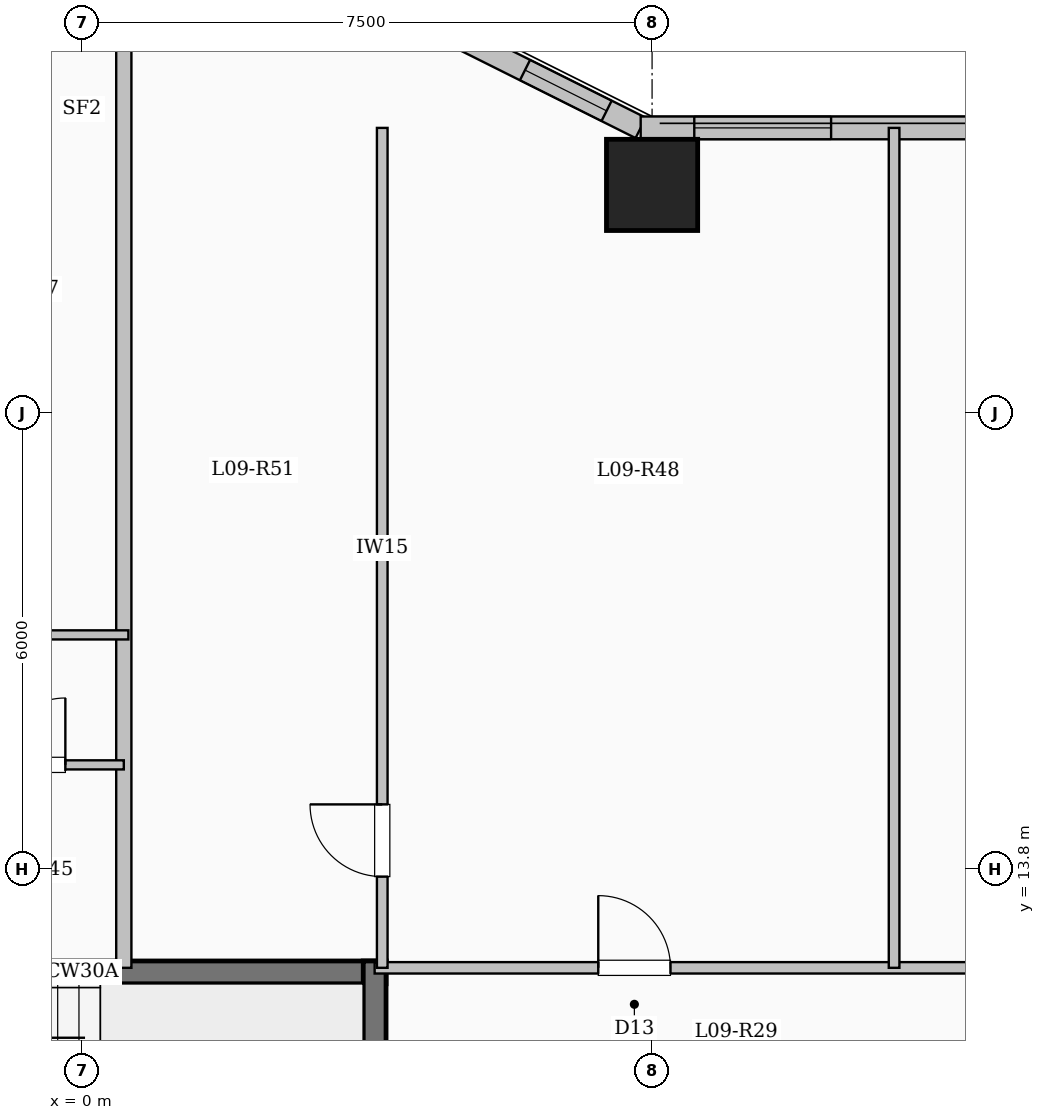
"""IFC4 building model, lengths in metres.
Left out: names, types, materials, properties, quantities, classifications, styles, units other than length and angle.
Written with IfcOpenShell. Run it as: python <this file> out.ifc"""

import sys

from ifc_helpers import new_model, si_unit, direction, frame, frame_2d, origin, origin_2d, place, context, subcontext, project, spatial, rectangle, extrude, element, fill, save


model = new_model("IFC4")
c1 = context("Model", 3, precision=1e-05, world=origin(), true_north=direction((0.0, 1.0)))
c2 = subcontext(c1, "Body", "Model", "MODEL_VIEW")
j1 = project(units=[si_unit("LENGTHUNIT", "METRE"), si_unit("PLANEANGLEUNIT", "RADIAN")], contexts=[c1])
p1 = place(None, origin())
s1 = spatial("IfcSite", under=j1, at=p1, CompositionType="ELEMENT")
p2 = place(p1, origin())
s2 = spatial("IfcBuilding", under=s1, at=p2, CompositionType="ELEMENT")
p3 = place(p2, frame((0.0, 0.0, 37.4)))
s3 = spatial("IfcBuildingStorey", under=s2, at=p3, CompositionType="ELEMENT", Elevation=37.4)
p4 = place(p3, frame((7.5, 22.8, 0.0), z_axis=(0.0, 0.0, 1.0), x_axis=(1.0, 0.0, 0.0)))
e1 = element("IfcColumn", 1, at=p4, inside=s3, PredefinedType="COLUMN", context=c2, shape_type="SweptSolid", body=[
    extrude(rectangle(XDim=1.2, YDim=1.2, at=origin_2d()), origin(), (0.0, 0.0, 1.0), 3.35),
])
p5 = place(p3, frame((4.35, 25.05, 0.0), z_axis=(0.0, 0.0, 1.0), x_axis=(0.894427191, -0.4472135955, 0.0)))
e2 = element("IfcWall", 2, at=p5, inside=s3, PredefinedType="SOLIDWALL", context=c2, shape_type="SweptSolid", body=[
    extrude(rectangle(XDim=3.354, YDim=0.3, at=frame_2d((1.677, 0.0))), origin(), (0.0, 0.0, 1.0), 3.1),
])
p6 = place(p5, frame((1.653, 0.0, 0.95)))
e3 = element("IfcOpeningElement", 3, at=p6, cuts=e2, PredefinedType="OPENING", context=c2, shape_type="SweptSolid", body=[
    extrude(rectangle(XDim=1.2, YDim=1.5, at=frame_2d((0.6, 0.75))), frame((0.0, 0.16, 0.0), z_axis=(0.0, -1.0, 0.0), x_axis=(1.0, 0.0, 0.0)), (0.0, 0.0, 1.0), 0.32),
])
p7 = place(p3, frame((7.35, 23.55, 0.0), z_axis=(0.0, 0.0, 1.0), x_axis=(1.0, 0.0, 0.0)))
e4 = element("IfcWall", 4, at=p7, inside=s3, PredefinedType="SOLIDWALL", context=c2, shape_type="SweptSolid", body=[
    extrude(rectangle(XDim=15.3, YDim=0.3, at=frame_2d((7.65, 0.0))), origin(), (0.0, 0.0, 1.0), 3.1),
])
p8 = place(p7, frame((0.705, 0.0, 0.9)))
e5 = element("IfcOpeningElement", 5, at=p8, cuts=e4, PredefinedType="OPENING", context=c2, shape_type="SweptSolid", body=[
    extrude(rectangle(XDim=1.8, YDim=1.65, at=frame_2d((0.9, 0.825))), frame((0.0, 0.16, 0.0), z_axis=(0.0, -1.0, 0.0), x_axis=(1.0, 0.0, 0.0)), (0.0, 0.0, 1.0), 0.32),
])
p9 = place(p7, frame((5.672, 0.0, 0.9)))
e6 = element("IfcOpeningElement", 6, at=p9, cuts=e4, PredefinedType="OPENING", context=c2, shape_type="SweptSolid", body=[
    extrude(rectangle(XDim=2.0, YDim=1.7, at=frame_2d((1.0, 0.85))), frame((0.0, 0.16, 0.0), z_axis=(0.0, -1.0, 0.0), x_axis=(1.0, 0.0, 0.0)), (0.0, 0.0, 1.0), 0.32),
])
p10 = place(p7, frame((11.641, 0.0, 0.9)))
e7 = element("IfcOpeningElement", 7, at=p10, cuts=e4, PredefinedType="OPENING", context=c2, shape_type="SweptSolid", body=[
    extrude(rectangle(XDim=2.0, YDim=1.7, at=frame_2d((1.0, 0.85))), frame((0.0, 0.16, 0.0), z_axis=(0.0, -1.0, 0.0), x_axis=(1.0, 0.0, 0.0)), (0.0, 0.0, 1.0), 0.32),
])
p11 = place(p3, frame((-4.0, 12.44, 0.0), z_axis=(0.0, 0.0, 1.0), x_axis=(1.0, 0.0, 0.0)))
e8 = element("IfcWall", 8, at=p11, inside=s3, PredefinedType="SHEAR", context=c2, shape_type="SweptSolid", body=[
    extrude(rectangle(XDim=8.0, YDim=0.3, at=frame_2d((4.0, 0.0))), origin(), (0.0, 0.0, 1.0), 3.35),
])
p12 = place(p3, frame((3.85, 9.0, 0.0), z_axis=(0.0, 0.0, 1.0), x_axis=(0.0, 1.0, 0.0)))
e9 = element("IfcWall", 9, at=p12, inside=s3, PredefinedType="SHEAR", context=c2, shape_type="SweptSolid", body=[
    extrude(rectangle(XDim=3.59, YDim=0.3, at=frame_2d((1.795, 0.0))), origin(), (0.0, 0.0, 1.0), 3.35),
])
p13 = place(p3, frame((3.85, 12.5, 0.0), z_axis=(0.0, 0.0, 1.0), x_axis=(1.0, 0.0, 0.0)))
e10 = element("IfcWall", 10, at=p13, inside=s3, PredefinedType="PARTITIONING", context=c2, shape_type="SweptSolid", body=[
    extrude(rectangle(XDim=18.7, YDim=0.15, at=frame_2d((9.35, 0.0))), origin(), (0.0, 0.0, 1.0), 3.1),
])
p14 = place(p13, frame((2.942, 0.0, 0.0)))
e11 = element("IfcOpeningElement", 11, at=p14, cuts=e10, PredefinedType="OPENING", context=c2, shape_type="SweptSolid", body=[
    extrude(rectangle(XDim=0.95, YDim=2.15, at=frame_2d((0.475, 1.075))), frame((0.0, 0.085, 0.0), z_axis=(0.0, -1.0, 0.0), x_axis=(1.0, 0.0, 0.0)), (0.0, 0.0, 1.0), 0.17),
])
p15 = place(p13, frame((9.647, 0.0, 0.0)))
e12 = element("IfcOpeningElement", 12, at=p15, cuts=e10, PredefinedType="OPENING", context=c2, shape_type="SweptSolid", body=[
    extrude(rectangle(XDim=0.95, YDim=2.15, at=frame_2d((0.475, 1.075))), frame((0.0, 0.085, 0.0), z_axis=(0.0, -1.0, 0.0), x_axis=(1.0, 0.0, 0.0)), (0.0, 0.0, 1.0), 0.17),
])
p16 = place(p13, frame((15.61, 0.0, 0.0)))
e13 = element("IfcOpeningElement", 13, at=p16, cuts=e10, PredefinedType="OPENING", context=c2, shape_type="SweptSolid", body=[
    extrude(rectangle(XDim=0.95, YDim=2.15, at=frame_2d((0.475, 1.075))), frame((0.0, 0.085, 0.0), z_axis=(0.0, -1.0, 0.0), x_axis=(1.0, 0.0, 0.0)), (0.0, 0.0, 1.0), 0.17),
])
p17 = place(p3, frame((0.55, 12.5, 0.0), z_axis=(0.0, 0.0, 1.0), x_axis=(0.0, 1.0, 0.0)))
e14 = element("IfcWall", 14, at=p17, inside=s3, PredefinedType="SOLIDWALL", context=c2, shape_type="SweptSolid", body=[
    extrude(rectangle(XDim=12.58, YDim=0.2, at=frame_2d((6.29, 0.0))), origin(), (0.0, 0.0, 1.0), 3.1),
])
p18 = place(p3, frame((-1.868, 15.17, 0.0), z_axis=(0.0, 0.0, 1.0), x_axis=(1.0, 0.0, 0.0)))
e15 = element("IfcWall", 15, at=p18, inside=s3, PredefinedType="PARTITIONING", context=c2, shape_type="SweptSolid", body=[
    extrude(rectangle(XDim=2.418, YDim=0.12, at=frame_2d((1.209, 0.0))), origin(), (0.0, 0.0, 1.0), 3.1),
])
p19 = place(p18, frame((0.769, 0.0, 0.0)))
e16 = element("IfcOpeningElement", 16, at=p19, cuts=e15, PredefinedType="OPENING", context=c2, shape_type="SweptSolid", body=[
    extrude(rectangle(XDim=0.88, YDim=2.1, at=frame_2d((0.44, 1.05))), frame((0.0, 0.07, 0.0), z_axis=(0.0, -1.0, 0.0), x_axis=(1.0, 0.0, 0.0)), (0.0, 0.0, 1.0), 0.14),
])
p20 = place(p3, frame((-5.054, 16.88, 0.0), z_axis=(0.0, 0.0, 1.0), x_axis=(1.0, 0.0, 0.0)))
e17 = element("IfcWall", 17, at=p20, inside=s3, PredefinedType="PARTITIONING", context=c2, shape_type="SweptSolid", body=[
    extrude(rectangle(XDim=5.664, YDim=0.12, at=frame_2d((2.832, 0.0))), origin(), (0.0, 0.0, 1.0), 3.1),
])
p21 = place(p20, frame((0.931, 0.0, 0.0)))
e18 = element("IfcOpeningElement", 18, at=p21, cuts=e17, PredefinedType="OPENING", context=c2, shape_type="SweptSolid", body=[
    extrude(rectangle(XDim=0.88, YDim=2.1, at=frame_2d((0.44, 1.05))), frame((0.0, 0.07, 0.0), z_axis=(0.0, -1.0, 0.0), x_axis=(1.0, 0.0, 0.0)), (0.0, 0.0, 1.0), 0.14),
])
p22 = place(p20, frame((3.673, 0.0, 0.0)))
e19 = element("IfcOpeningElement", 19, at=p22, cuts=e17, PredefinedType="OPENING", context=c2, shape_type="SweptSolid", body=[
    extrude(rectangle(XDim=0.88, YDim=2.1, at=frame_2d((0.44, 1.05))), frame((0.0, 0.07, 0.0), z_axis=(0.0, -1.0, 0.0), x_axis=(1.0, 0.0, 0.0)), (0.0, 0.0, 1.0), 0.14),
])
p23 = place(p3, frame((3.95, 12.5, 0.0), z_axis=(0.0, 0.0, 1.0), x_axis=(0.0, 1.0, 0.0)))
e20 = element("IfcWall", 20, at=p23, inside=s3, PredefinedType="PARTITIONING", context=c2, shape_type="SweptSolid", body=[
    extrude(rectangle(XDim=11.05, YDim=0.14, at=frame_2d((5.525, 0.0))), origin(), (0.0, 0.0, 1.0), 3.1),
])
p24 = place(p23, frame((1.2, 0.0, 0.0)))
e21 = element("IfcOpeningElement", 21, at=p24, cuts=e20, PredefinedType="OPENING", context=c2, shape_type="SweptSolid", body=[
    extrude(rectangle(XDim=0.95, YDim=2.15, at=frame_2d((0.475, 1.075))), frame((0.0, 0.08, 0.0), z_axis=(0.0, -1.0, 0.0), x_axis=(1.0, 0.0, 0.0)), (0.0, 0.0, 1.0), 0.16),
])
p25 = place(p3, frame((10.684, 12.5, 0.0), z_axis=(0.0, 0.0, 1.0), x_axis=(0.0, 1.0, 0.0)))
e22 = element("IfcWall", 22, at=p25, inside=s3, PredefinedType="PARTITIONING", context=c2, shape_type="SweptSolid", body=[
    extrude(rectangle(XDim=11.05, YDim=0.14, at=frame_2d((5.525, 0.0))), origin(), (0.0, 0.0, 1.0), 3.1),
])
p26 = place(p6, origin())
e23 = element("IfcWindow", 23, at=p26, inside=s3, PartitioningType="SINGLE_PANEL", PredefinedType="WINDOW", context=c2, shape_type="SweptSolid", body=[
    extrude(rectangle(XDim=1.2, YDim=1.5, at=frame_2d((0.6, 0.75))), frame((0.0, 0.03, 0.0), z_axis=(0.0, -1.0, 0.0), x_axis=(1.0, 0.0, 0.0)), (0.0, 0.0, 1.0), 0.06),
])
fill(e3, e23)
p27 = place(p8, origin())
e24 = element("IfcWindow", 24, at=p27, inside=s3, PartitioningType="SINGLE_PANEL", PredefinedType="WINDOW", context=c2, shape_type="SweptSolid", body=[
    extrude(rectangle(XDim=1.8, YDim=1.65, at=frame_2d((0.9, 0.825))), frame((0.0, 0.03, 0.0), z_axis=(0.0, -1.0, 0.0), x_axis=(1.0, 0.0, 0.0)), (0.0, 0.0, 1.0), 0.06),
])
fill(e5, e24)
p28 = place(p19, origin())
e25 = element("IfcDoor", 25, at=p28, inside=s3, OperationType="SINGLE_SWING_RIGHT", PredefinedType="DOOR", context=c2, shape_type="SweptSolid", body=[
    extrude(rectangle(XDim=0.88, YDim=2.1, at=frame_2d((0.44, 1.05))), frame((0.0, 0.025, 0.0), z_axis=(0.0, -1.0, 0.0), x_axis=(1.0, 0.0, 0.0)), (0.0, 0.0, 1.0), 0.05),
])
fill(e16, e25)
p29 = place(p14, origin())
e26 = element("IfcDoor", 26, at=p29, inside=s3, OperationType="SINGLE_SWING_LEFT", PredefinedType="DOOR", context=c2, shape_type="SweptSolid", body=[
    extrude(rectangle(XDim=0.95, YDim=2.15, at=frame_2d((0.475, 1.075))), frame((0.0, 0.025, 0.0), z_axis=(0.0, -1.0, 0.0), x_axis=(1.0, 0.0, 0.0)), (0.0, 0.0, 1.0), 0.05),
])
fill(e11, e26)
p30 = place(p24, origin())
e27 = element("IfcDoor", 27, at=p30, inside=s3, OperationType="SINGLE_SWING_RIGHT", PredefinedType="DOOR", context=c2, shape_type="SweptSolid", body=[
    extrude(rectangle(XDim=0.95, YDim=2.15, at=frame_2d((0.475, 1.075))), frame((0.0, 0.025, 0.0), z_axis=(0.0, -1.0, 0.0), x_axis=(1.0, 0.0, 0.0)), (0.0, 0.0, 1.0), 0.05),
])
fill(e21, e27)
save(model, sys.argv[1])
